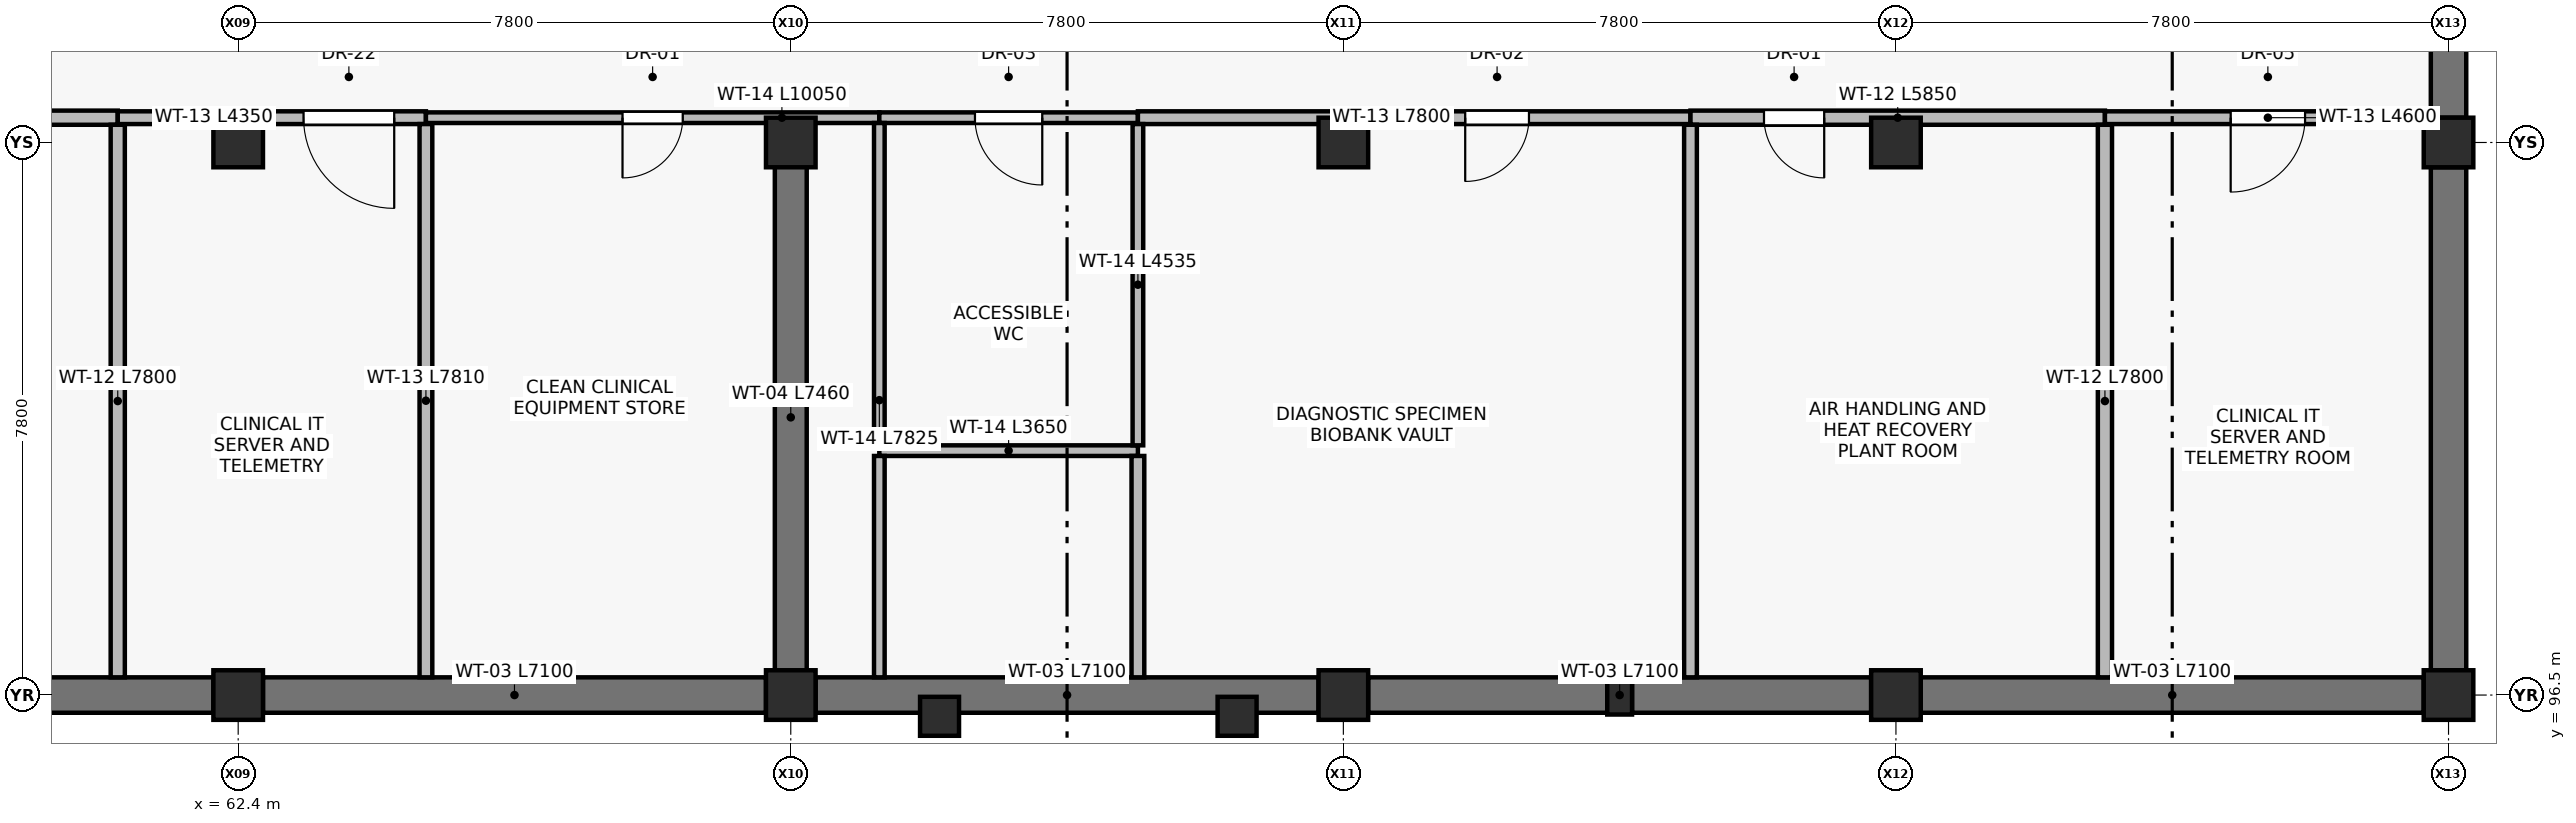
"""IFC4 building model, lengths in metres.
Left out: names, types, materials, properties, quantities, classifications, styles, units other than length and angle.
Written with IfcOpenShell. Run it as: python <this file> out.ifc"""

import sys

from ifc_helpers import new_model, si_unit, direction, frame, frame_2d, origin, origin_2d, place, context, subcontext, project, spatial, rectangle, extrude, element, fill, save


model = new_model("IFC4")
c1 = context("Model", 3, precision=1e-05, world=origin(), true_north=direction((0.0, 1.0)))
c2 = subcontext(c1, "Body", "Model", "MODEL_VIEW")
j1 = project(units=[si_unit("LENGTHUNIT", "METRE"), si_unit("PLANEANGLEUNIT", "RADIAN")], contexts=[c1])
p1 = place(None, origin())
s1 = spatial("IfcSite", under=j1, at=p1, CompositionType="ELEMENT")
p2 = place(p1, origin())
s2 = spatial("IfcBuilding", under=s1, at=p2, CompositionType="ELEMENT")
p3 = place(p2, frame((0.0, 0.0, -4.5)))
s3 = spatial("IfcBuildingStorey", under=s2, at=p3, CompositionType="ELEMENT", Elevation=-4.5)
for number, where, z_axis, x_axis in (
    (1, (62.4, 96.5, 0.0), (0.0, 0.0, 1.0), (1.0, 0.0, 0.0)),
    (2, (62.4, 104.3, 0.0), (0.0, 0.0, 1.0), (1.0, 0.0, 0.0)),
    (3, (70.2, 96.5, 0.0), (0.0, 0.0, 1.0), (1.0, 0.0, 0.0)),
    (4, (70.2, 104.3, 0.0), (0.0, 0.0, 1.0), (1.0, 0.0, 0.0)),
    (5, (78.0, 96.5, 0.0), (0.0, 0.0, 1.0), (1.0, 0.0, 0.0)),
    (6, (78.0, 104.3, 0.0), (0.0, 0.0, 1.0), (1.0, 0.0, 0.0)),
    (7, (85.8, 96.5, 0.0), (0.0, 0.0, 1.0), (1.0, 0.0, 0.0)),
    (8, (85.8, 104.3, 0.0), (0.0, 0.0, 1.0), (1.0, 0.0, 0.0)),
    (9, (93.6, 96.5, 0.0), (0.0, 0.0, 1.0), (1.0, 0.0, 0.0)),
    (10, (93.6, 104.3, 0.0), (0.0, 0.0, 1.0), (1.0, 0.0, 0.0)),
):
    element("IfcColumn", number, at=place(p3, frame(where, z_axis=z_axis, x_axis=x_axis)), inside=s3, PredefinedType="COLUMN", context=c2, shape_type="SweptSolid", body=[
        extrude(rectangle(XDim=0.7, YDim=0.7, at=origin_2d()), origin(), (0.0, 0.0, 1.0), 4.5),
    ])
for number, where, z_axis, x_axis in (
    (11, (72.3, 96.2, 0.0), (0.0, 0.0, 1.0), (1.0, 0.0, 0.0)),
    (12, (76.5, 96.2, 0.0), (0.0, 0.0, 1.0), (1.0, 0.0, 0.0)),
):
    element("IfcColumn", number, at=place(p3, frame(where, z_axis=z_axis, x_axis=x_axis)), inside=s3, PredefinedType="COLUMN", context=c2, shape_type="SweptSolid", body=[
        extrude(rectangle(XDim=0.55, YDim=0.55, at=origin_2d()), origin(), (0.0, 0.0, 1.0), 4.5),
    ])
p4 = place(p3, frame((81.9, 96.5, 0.0), z_axis=(0.0, 0.0, 1.0), x_axis=(1.0, 0.0, 0.0)))
e13 = element("IfcColumn", 13, at=p4, inside=s3, PredefinedType="PILASTER", context=c2, shape_type="SweptSolid", body=[
    extrude(rectangle(XDim=0.35, YDim=0.55, at=origin_2d()), origin(), (0.0, 0.0, 1.0), 4.5),
])
p5 = place(p3, frame((93.6, 107.85, 0.0), z_axis=(0.0, 0.0, 1.0), x_axis=(0.0, -1.0, 0.0)))
e14 = element("IfcWall", 14, at=p5, inside=s3, PredefinedType="SOLIDWALL", context=c2, shape_type="SweptSolid", body=[
    extrude(rectangle(XDim=3.2, YDim=0.5, at=frame_2d((1.6, 0.0))), origin(), (0.0, 0.0, 1.0), 4.12),
])
p6 = place(p3, frame((93.6, 103.95, 0.0), z_axis=(0.0, 0.0, 1.0), x_axis=(0.0, -1.0, 0.0)))
e15 = element("IfcWall", 15, at=p6, inside=s3, PredefinedType="SOLIDWALL", context=c2, shape_type="SweptSolid", body=[
    extrude(rectangle(XDim=7.1, YDim=0.5, at=frame_2d((3.55, 0.0))), origin(), (0.0, 0.0, 1.0), 4.12),
])
p7 = place(p3, frame((93.25, 96.5, 0.0), z_axis=(0.0, 0.0, 1.0), x_axis=(-1.0, 0.0, 0.0)))
e16 = element("IfcWall", 16, at=p7, inside=s3, PredefinedType="SOLIDWALL", context=c2, shape_type="SweptSolid", body=[
    extrude(rectangle(XDim=7.1, YDim=0.5, at=frame_2d((3.55, 0.0))), origin(), (0.0, 0.0, 1.0), 4.12),
])
for number, where, z_axis, x_axis in (
    (17, (85.45, 96.5, 0.0), (0.0, 0.0, 1.0), (-1.0, 0.0, 0.0)),
    (18, (81.725, 96.5, 0.0), (0.0, 0.0, 1.0), (-1.0, 0.0, 0.0)),
):
    element("IfcWall", number, at=place(p3, frame(where, z_axis=z_axis, x_axis=x_axis)), inside=s3, PredefinedType="SOLIDWALL", context=c2, shape_type="SweptSolid", body=[
        extrude(rectangle(XDim=3.375, YDim=0.5, at=frame_2d((1.688, 0.0))), origin(), (0.0, 0.0, 1.0), 4.12),
    ])
p8 = place(p3, frame((77.65, 96.5, 0.0), z_axis=(0.0, 0.0, 1.0), x_axis=(-1.0, 0.0, 0.0)))
e19 = element("IfcWall", 19, at=p8, inside=s3, PredefinedType="SOLIDWALL", context=c2, shape_type="SweptSolid", body=[
    extrude(rectangle(XDim=7.1, YDim=0.5, at=frame_2d((3.55, 0.0))), origin(), (0.0, 0.0, 1.0), 4.12),
])
for number, where, z_axis, x_axis in (
    (20, (69.85, 96.5, 0.0), (0.0, 0.0, 1.0), (-1.0, 0.0, 0.0)),
    (21, (62.05, 96.5, 0.0), (0.0, 0.0, 1.0), (-1.0, 0.0, 0.0)),
):
    element("IfcWall", number, at=place(p3, frame(where, z_axis=z_axis, x_axis=x_axis)), inside=s3, PredefinedType="SOLIDWALL", context=c2, shape_type="SweptSolid", body=[
        extrude(rectangle(XDim=7.1, YDim=0.5, at=frame_2d((3.55, 0.0))), origin(), (0.0, 0.0, 1.0), 4.12),
    ])
p9 = place(p3, frame((70.2, 96.69, 0.0), z_axis=(0.0, 0.0, 1.0), x_axis=(0.0, 1.0, 0.0)))
e22 = element("IfcWall", 22, at=p9, inside=s3, PredefinedType="SHEAR", context=c2, shape_type="SweptSolid", body=[
    extrude(rectangle(XDim=7.46, YDim=0.45, at=frame_2d((3.73, 0.0))), origin(), (0.0, 0.0, 1.0), 4.2),
])
p10 = place(p3, frame((60.7, 104.65, 0.0), z_axis=(0.0, 0.0, 1.0), x_axis=(-1.0, 0.0, 0.0)))
e23 = element("IfcWall", 23, at=p10, inside=s3, PredefinedType="SOLIDWALL", context=c2, shape_type="SweptSolid", body=[
    extrude(rectangle(XDim=5.85, YDim=0.2, at=frame_2d((2.925, 0.0))), origin(), (0.0, 0.0, 1.0), 3.71),
])
p11 = place(p10, frame((2.5, 0.0, 0.0)))
e24 = element("IfcOpeningElement", 24, at=p11, cuts=e23, PredefinedType="OPENING", context=c2, shape_type="SweptSolid", body=[
    extrude(rectangle(XDim=0.85, YDim=2.1, at=frame_2d((0.425, 1.05))), frame((0.0, 0.11, 0.0), z_axis=(0.0, -1.0, 0.0), x_axis=(1.0, 0.0, 0.0)), (0.0, 0.0, 1.0), 0.22),
])
p12 = place(p3, frame((65.05, 104.65, 0.0), z_axis=(0.0, 0.0, 1.0), x_axis=(-1.0, 0.0, 0.0)))
e25 = element("IfcWall", 25, at=p12, inside=s3, PredefinedType="PARTITIONING", context=c2, shape_type="SweptSolid", body=[
    extrude(rectangle(XDim=4.35, YDim=0.18, at=frame_2d((2.175, 0.0))), origin(), (0.0, 0.0, 1.0), 3.71),
])
p13 = place(p12, frame((0.448, 0.0, 0.0)))
e26 = element("IfcOpeningElement", 26, at=p13, cuts=e25, PredefinedType="OPENING", context=c2, shape_type="SweptSolid", body=[
    extrude(rectangle(XDim=1.28, YDim=2.25, at=frame_2d((0.64, 1.125))), frame((0.0, 0.1, 0.0), z_axis=(0.0, -1.0, 0.0), x_axis=(1.0, 0.0, 0.0)), (0.0, 0.0, 1.0), 0.2),
])
p14 = place(p3, frame((71.45, 104.65, 0.0), z_axis=(0.0, 0.0, 1.0), x_axis=(-1.0, 0.0, 0.0)))
e27 = element("IfcWall", 27, at=p14, inside=s3, PredefinedType="PARTITIONING", context=c2, shape_type="SweptSolid", body=[
    extrude(rectangle(XDim=6.4, YDim=0.15, at=frame_2d((3.2, 0.0))), origin(), (0.0, 0.0, 1.0), 3.71),
])
p15 = place(p14, frame((2.775, 0.0, 0.0)))
e28 = element("IfcOpeningElement", 28, at=p15, cuts=e27, PredefinedType="OPENING", context=c2, shape_type="SweptSolid", body=[
    extrude(rectangle(XDim=0.85, YDim=2.1, at=frame_2d((0.425, 1.05))), frame((0.0, 0.085, 0.0), z_axis=(0.0, -1.0, 0.0), x_axis=(1.0, 0.0, 0.0)), (0.0, 0.0, 1.0), 0.17),
])
p16 = place(p3, frame((75.1, 104.65, 0.0), z_axis=(0.0, 0.0, 1.0), x_axis=(-1.0, 0.0, 0.0)))
e29 = element("IfcWall", 29, at=p16, inside=s3, PredefinedType="PARTITIONING", context=c2, shape_type="SweptSolid", body=[
    extrude(rectangle(XDim=3.65, YDim=0.15, at=frame_2d((1.825, 0.0))), origin(), (0.0, 0.0, 1.0), 3.71),
])
p17 = place(p16, frame((1.35, 0.0, 0.0)))
e30 = element("IfcOpeningElement", 30, at=p17, cuts=e29, PredefinedType="OPENING", context=c2, shape_type="SweptSolid", body=[
    extrude(rectangle(XDim=0.95, YDim=2.1, at=frame_2d((0.475, 1.05))), frame((0.0, 0.085, 0.0), z_axis=(0.0, -1.0, 0.0), x_axis=(1.0, 0.0, 0.0)), (0.0, 0.0, 1.0), 0.17),
])
p18 = place(p3, frame((71.45, 99.95, 0.0), z_axis=(0.0, 0.0, 1.0), x_axis=(1.0, 0.0, 0.0)))
e31 = element("IfcWall", 31, at=p18, inside=s3, PredefinedType="PARTITIONING", context=c2, shape_type="SweptSolid", body=[
    extrude(rectangle(XDim=3.65, YDim=0.15, at=frame_2d((1.825, 0.0))), origin(), (0.0, 0.0, 1.0), 4.2),
])
p19 = place(p3, frame((82.9, 104.65, 0.0), z_axis=(0.0, 0.0, 1.0), x_axis=(-1.0, 0.0, 0.0)))
e32 = element("IfcWall", 32, at=p19, inside=s3, PredefinedType="PARTITIONING", context=c2, shape_type="SweptSolid", body=[
    extrude(rectangle(XDim=7.8, YDim=0.18, at=frame_2d((3.9, 0.0))), origin(), (0.0, 0.0, 1.0), 3.71),
])
p20 = place(p19, frame((2.28, 0.0, 0.0)))
e33 = element("IfcOpeningElement", 33, at=p20, cuts=e32, PredefinedType="OPENING", context=c2, shape_type="SweptSolid", body=[
    extrude(rectangle(XDim=0.9, YDim=2.1, at=frame_2d((0.45, 1.05))), frame((0.0, 0.1, 0.0), z_axis=(0.0, -1.0, 0.0), x_axis=(1.0, 0.0, 0.0)), (0.0, 0.0, 1.0), 0.2),
])
p21 = place(p3, frame((88.75, 104.65, 0.0), z_axis=(0.0, 0.0, 1.0), x_axis=(-1.0, 0.0, 0.0)))
e34 = element("IfcWall", 34, at=p21, inside=s3, PredefinedType="SOLIDWALL", context=c2, shape_type="SweptSolid", body=[
    extrude(rectangle(XDim=5.85, YDim=0.2, at=frame_2d((2.925, 0.0))), origin(), (0.0, 0.0, 1.0), 3.71),
])
p22 = place(p21, frame((3.962, 0.0, 0.0)))
e35 = element("IfcOpeningElement", 35, at=p22, cuts=e34, PredefinedType="OPENING", context=c2, shape_type="SweptSolid", body=[
    extrude(rectangle(XDim=0.85, YDim=2.1, at=frame_2d((0.425, 1.05))), frame((0.0, 0.11, 0.0), z_axis=(0.0, -1.0, 0.0), x_axis=(1.0, 0.0, 0.0)), (0.0, 0.0, 1.0), 0.22),
])
p23 = place(p3, frame((93.35, 104.65, 0.0), z_axis=(0.0, 0.0, 1.0), x_axis=(-1.0, 0.0, 0.0)))
e36 = element("IfcWall", 36, at=p23, inside=s3, PredefinedType="PARTITIONING", context=c2, shape_type="SweptSolid", body=[
    extrude(rectangle(XDim=4.6, YDim=0.18, at=frame_2d((2.3, 0.0))), origin(), (0.0, 0.0, 1.0), 3.71),
])
p24 = place(p23, frame((1.775, 0.0, 0.0)))
e37 = element("IfcOpeningElement", 37, at=p24, cuts=e36, PredefinedType="OPENING", context=c2, shape_type="SweptSolid", body=[
    extrude(rectangle(XDim=1.05, YDim=2.15, at=frame_2d((0.525, 1.075))), frame((0.0, 0.1, 0.0), z_axis=(0.0, -1.0, 0.0), x_axis=(1.0, 0.0, 0.0)), (0.0, 0.0, 1.0), 0.2),
])
p25 = place(p3, frame((60.7, 96.75, 0.0), z_axis=(0.0, 0.0, 1.0), x_axis=(0.0, 1.0, 0.0)))
e38 = element("IfcWall", 38, at=p25, inside=s3, PredefinedType="SOLIDWALL", context=c2, shape_type="SweptSolid", body=[
    extrude(rectangle(XDim=7.8, YDim=0.2, at=frame_2d((3.9, 0.0))), origin(), (0.0, 0.0, 1.0), 4.2),
])
p26 = place(p3, frame((65.05, 96.75, 0.0), z_axis=(0.0, 0.0, 1.0), x_axis=(0.0, 1.0, 0.0)))
e39 = element("IfcWall", 39, at=p26, inside=s3, PredefinedType="PARTITIONING", context=c2, shape_type="SweptSolid", body=[
    extrude(rectangle(XDim=7.81, YDim=0.18, at=frame_2d((3.905, 0.0))), origin(), (0.0, 0.0, 1.0), 3.84),
])
p27 = place(p3, frame((71.45, 96.75, 0.0), z_axis=(0.0, 0.0, 1.0), x_axis=(0.0, 1.0, 0.0)))
e40 = element("IfcWall", 40, at=p27, inside=s3, PredefinedType="PARTITIONING", context=c2, shape_type="SweptSolid", body=[
    extrude(rectangle(XDim=3.125, YDim=0.15, at=frame_2d((1.562, 0.0))), origin(), (0.0, 0.0, 1.0), 4.2),
])
p28 = place(p3, frame((71.45, 100.025, 0.0), z_axis=(0.0, 0.0, 1.0), x_axis=(0.0, 1.0, 0.0)))
e41 = element("IfcWall", 41, at=p28, inside=s3, PredefinedType="PARTITIONING", context=c2, shape_type="SweptSolid", body=[
    extrude(rectangle(XDim=4.55, YDim=0.15, at=frame_2d((2.275, 0.0))), origin(), (0.0, 0.0, 1.0), 4.2),
])
p29 = place(p3, frame((75.1, 100.025, 0.0), z_axis=(0.0, 0.0, 1.0), x_axis=(0.0, 1.0, 0.0)))
e42 = element("IfcWall", 42, at=p29, inside=s3, PredefinedType="PARTITIONING", context=c2, shape_type="SweptSolid", body=[
    extrude(rectangle(XDim=4.535, YDim=0.15, at=frame_2d((2.268, 0.0))), origin(), (0.0, 0.0, 1.0), 3.84),
])
p30 = place(p3, frame((75.1, 96.75, 0.0), z_axis=(0.0, 0.0, 1.0), x_axis=(0.0, 1.0, 0.0)))
e43 = element("IfcWall", 43, at=p30, inside=s3, PredefinedType="PARTITIONING", context=c2, shape_type="SweptSolid", body=[
    extrude(rectangle(XDim=3.125, YDim=0.18, at=frame_2d((1.562, 0.0))), origin(), (0.0, 0.0, 1.0), 3.84),
])
p31 = place(p3, frame((82.9, 96.75, 0.0), z_axis=(0.0, 0.0, 1.0), x_axis=(0.0, 1.0, 0.0)))
e44 = element("IfcWall", 44, at=p31, inside=s3, PredefinedType="PARTITIONING", context=c2, shape_type="SweptSolid", body=[
    extrude(rectangle(XDim=7.8, YDim=0.18, at=frame_2d((3.9, 0.0))), origin(), (0.0, 0.0, 1.0), 3.84),
])
p32 = place(p3, frame((88.75, 96.75, 0.0), z_axis=(0.0, 0.0, 1.0), x_axis=(0.0, 1.0, 0.0)))
e45 = element("IfcWall", 45, at=p32, inside=s3, PredefinedType="SOLIDWALL", context=c2, shape_type="SweptSolid", body=[
    extrude(rectangle(XDim=7.8, YDim=0.2, at=frame_2d((3.9, 0.0))), origin(), (0.0, 0.0, 1.0), 3.84),
])
p33 = place(p13, origin())
e46 = element("IfcDoor", 46, at=p33, inside=s3, OperationType="SINGLE_SWING_LEFT", PredefinedType="DOOR", context=c2, shape_type="SweptSolid", body=[
    extrude(rectangle(XDim=1.28, YDim=2.25, at=frame_2d((0.64, 1.125))), frame((0.0, 0.025, 0.0), z_axis=(0.0, -1.0, 0.0), x_axis=(1.0, 0.0, 0.0)), (0.0, 0.0, 1.0), 0.05),
])
fill(e26, e46)
p34 = place(p15, origin())
e47 = element("IfcDoor", 47, at=p34, inside=s3, OperationType="SINGLE_SWING_RIGHT", PredefinedType="DOOR", context=c2, shape_type="SweptSolid", body=[
    extrude(rectangle(XDim=0.85, YDim=2.1, at=frame_2d((0.425, 1.05))), frame((0.0, 0.025, 0.0), z_axis=(0.0, -1.0, 0.0), x_axis=(1.0, 0.0, 0.0)), (0.0, 0.0, 1.0), 0.05),
])
fill(e28, e47)
p35 = place(p17, origin())
e48 = element("IfcDoor", 48, at=p35, inside=s3, OperationType="SINGLE_SWING_LEFT", PredefinedType="DOOR", context=c2, shape_type="SweptSolid", body=[
    extrude(rectangle(XDim=0.95, YDim=2.1, at=frame_2d((0.475, 1.05))), frame((0.0, 0.025, 0.0), z_axis=(0.0, -1.0, 0.0), x_axis=(1.0, 0.0, 0.0)), (0.0, 0.0, 1.0), 0.05),
])
fill(e30, e48)
p36 = place(p20, origin())
e49 = element("IfcDoor", 49, at=p36, inside=s3, OperationType="SINGLE_SWING_RIGHT", PredefinedType="DOOR", context=c2, shape_type="SweptSolid", body=[
    extrude(rectangle(XDim=0.9, YDim=2.1, at=frame_2d((0.45, 1.05))), frame((0.0, 0.025, 0.0), z_axis=(0.0, -1.0, 0.0), x_axis=(1.0, 0.0, 0.0)), (0.0, 0.0, 1.0), 0.05),
])
fill(e33, e49)
p37 = place(p22, origin())
e50 = element("IfcDoor", 50, at=p37, inside=s3, OperationType="SINGLE_SWING_LEFT", PredefinedType="DOOR", context=c2, shape_type="SweptSolid", body=[
    extrude(rectangle(XDim=0.85, YDim=2.1, at=frame_2d((0.425, 1.05))), frame((0.0, 0.025, 0.0), z_axis=(0.0, -1.0, 0.0), x_axis=(1.0, 0.0, 0.0)), (0.0, 0.0, 1.0), 0.05),
])
fill(e35, e50)
p38 = place(p24, origin())
e51 = element("IfcDoor", 51, at=p38, inside=s3, OperationType="SINGLE_SWING_RIGHT", PredefinedType="DOOR", context=c2, shape_type="SweptSolid", body=[
    extrude(rectangle(XDim=1.05, YDim=2.15, at=frame_2d((0.525, 1.075))), frame((0.0, 0.025, 0.0), z_axis=(0.0, -1.0, 0.0), x_axis=(1.0, 0.0, 0.0)), (0.0, 0.0, 1.0), 0.05),
])
fill(e37, e51)
save(model, sys.argv[1])
